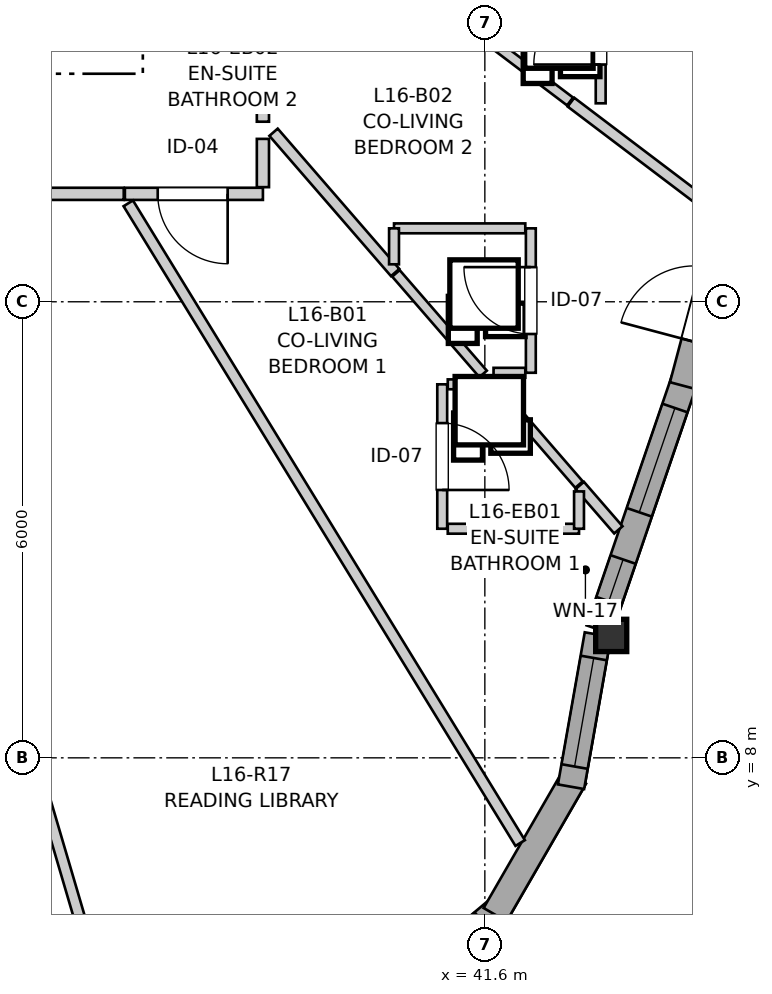
"""IFC4 building model, lengths in metres.
Left out: names, types, materials, properties, quantities, classifications, styles, units other than length and angle.
Written with IfcOpenShell. Run it as: python <this file> out.ifc"""

import sys

from ifc_helpers import new_model, si_unit, direction, frame, frame_2d, origin, origin_2d, place, context, subcontext, project, spatial, rectangle, i_section, extrude, source, transform, mapped, element, fill, save


model = new_model("IFC4")
c1 = context("Model", 3, precision=1e-05, world=origin(), true_north=direction((0.0, 1.0)))
c2 = subcontext(c1, "Body", "Model", "MODEL_VIEW")
j1 = project(units=[si_unit("LENGTHUNIT", "METRE"), si_unit("PLANEANGLEUNIT", "RADIAN")], contexts=[c1])
p1 = place(None, origin())
s1 = spatial("IfcSite", under=j1, at=p1, CompositionType="ELEMENT")
p2 = place(p1, origin())
s2 = spatial("IfcBuilding", under=s1, at=p2, CompositionType="ELEMENT")
p3 = place(p2, frame((0.0, 0.0, 55.8)))
s3 = spatial("IfcBuildingStorey", under=s2, at=p3, CompositionType="ELEMENT", Elevation=55.8)
m1 = source(origin(), c2, "Body", "SweptSolid", [
    extrude(i_section(OverallWidth=0.409, OverallDepth=0.425, WebThickness=0.03, FlangeThickness=0.048, FilletRadius=0.015, at=origin_2d()), origin(), (0.0, 0.0, 1.0), 2.94),
])
p4 = place(p3, frame((43.262, 9.611, 0.0), z_axis=(0.0, 0.0, 1.0), x_axis=(1.0, 0.0, 0.0)))
e1 = element("IfcColumn", 1, at=p4, inside=s3, PredefinedType="PILASTER", context=c2, shape_type="MappedRepresentation", body=[
    mapped(m1, transform((0.0, 0.0, 0.0), x_axis=(1.0, 0.0, 0.0), y_axis=(0.0, 1.0, 0.0), z_axis=(0.0, 0.0, 1.0), scale=1.0)),
])
p5 = place(p3, frame((40.221, 4.697, 0.0), z_axis=(0.0, 0.0, 1.0), x_axis=(0.766024572719, 0.642811289563, 0.0)))
e2 = element("IfcWall", 2, at=p5, inside=s3, PredefinedType="SOLIDWALL", context=c2, shape_type="SweptSolid", body=[
    extrude(rectangle(XDim=2.09, YDim=0.35, at=frame_2d((1.045, 0.0))), origin(), (0.0, 0.0, 1.0), 2.42),
])
p6 = place(p5, frame((0.32, 0.0, 0.82)))
e3 = element("IfcOpeningElement", 3, at=p6, cuts=e2, PredefinedType="OPENING", context=c2, shape_type="SweptSolid", body=[
    extrude(rectangle(XDim=1.45, YDim=1.25, at=frame_2d((0.725, 0.625))), frame((0.0, 0.185, 0.0), z_axis=(0.0, -1.0, 0.0), x_axis=(1.0, 0.0, 0.0)), (0.0, 0.0, 1.0), 0.37),
])
p7 = place(p3, frame((41.735, 5.937, 0.0), z_axis=(0.0, 0.0, 1.0), x_axis=(0.49990781971, 0.866078617559, 0.0)))
e4 = element("IfcWall", 4, at=p7, inside=s3, PredefinedType="SOLIDWALL", context=c2, shape_type="SweptSolid", body=[
    extrude(rectangle(XDim=2.09, YDim=0.35, at=frame_2d((1.045, 0.0))), origin(), (0.0, 0.0, 1.0), 2.42),
])
p8 = place(p3, frame((42.734, 7.62, 0.0), z_axis=(0.0, 0.0, 1.0), x_axis=(0.173607131876, 0.984814989611, 0.0)))
e5 = element("IfcWall", 5, at=p8, inside=s3, PredefinedType="SOLIDWALL", context=c2, shape_type="SweptSolid", body=[
    extrude(rectangle(XDim=2.032, YDim=0.35, at=frame_2d((1.016, 0.0))), origin(), (0.0, 0.0, 1.0), 2.42),
])
p9 = place(p8, frame((0.27, 0.0, 0.82)))
e6 = element("IfcOpeningElement", 6, at=p9, cuts=e5, PredefinedType="OPENING", context=c2, shape_type="SweptSolid", body=[
    extrude(rectangle(XDim=1.45, YDim=1.25, at=frame_2d((0.725, 0.625))), frame((0.0, 0.185, 0.0), z_axis=(0.0, -1.0, 0.0), x_axis=(1.0, 0.0, 0.0)), (0.0, 0.0, 1.0), 0.37),
])
p10 = place(p3, frame((43.104, 9.686, 0.0), z_axis=(0.0, 0.0, 1.0), x_axis=(0.323558843572, 0.946208050455, 0.0)))
e7 = element("IfcWall", 7, at=p10, inside=s3, PredefinedType="SOLIDWALL", context=c2, shape_type="SweptSolid", body=[
    extrude(rectangle(XDim=3.482, YDim=0.35, at=frame_2d((1.741, 0.0))), origin(), (0.0, 0.0, 1.0), 2.42),
])
p11 = place(p10, frame((0.396, 0.0, 0.82)))
e8 = element("IfcOpeningElement", 8, at=p11, cuts=e7, PredefinedType="OPENING", context=c2, shape_type="SweptSolid", body=[
    extrude(rectangle(XDim=0.58, YDim=1.35, at=frame_2d((0.29, 0.675))), frame((0.0, 0.185, 0.0), z_axis=(0.0, -1.0, 0.0), x_axis=(1.0, 0.0, 0.0)), (0.0, 0.0, 1.0), 0.37),
])
p12 = place(p10, frame((1.632, 0.0, 0.82)))
e9 = element("IfcOpeningElement", 9, at=p12, cuts=e7, PredefinedType="OPENING", context=c2, shape_type="SweptSolid", body=[
    extrude(rectangle(XDim=1.45, YDim=1.25, at=frame_2d((0.725, 0.625))), frame((0.0, 0.185, 0.0), z_axis=(0.0, -1.0, 0.0), x_axis=(1.0, 0.0, 0.0)), (0.0, 0.0, 1.0), 0.37),
])
p13 = place(p3, frame((44.205, 12.897, 0.0), z_axis=(0.0, 0.0, 1.0), x_axis=(0.257099428233, 0.966384956424, 0.0)))
e10 = element("IfcWall", 10, at=p13, inside=s3, PredefinedType="SOLIDWALL", context=c2, shape_type="SweptSolid", body=[
    extrude(rectangle(XDim=3.13, YDim=0.35, at=frame_2d((1.565, 0.0))), origin(), (0.0, 0.0, 1.0), 2.42),
])
p14 = place(p13, frame((0.595, 0.0, 0.0)))
e11 = element("IfcOpeningElement", 11, at=p14, cuts=e10, PredefinedType="OPENING", context=c2, shape_type="SweptSolid", body=[
    extrude(rectangle(XDim=1.0, YDim=2.1, at=frame_2d((0.5, 1.05))), frame((0.0, 0.185, 0.0), z_axis=(0.0, -1.0, 0.0), x_axis=(1.0, 0.0, 0.0)), (0.0, 0.0, 1.0), 0.37),
])
p15 = place(p3, frame((36.849, 15.42, 0.0), z_axis=(0.0, 0.0, 1.0), x_axis=(-1.0, 0.0, 0.0)))
e12 = element("IfcWall", 12, at=p15, inside=s3, PredefinedType="PARTITIONING", context=c2, shape_type="SweptSolid", body=[
    extrude(rectangle(XDim=3.401, YDim=0.16, at=frame_2d((1.701, 0.0))), origin(), (0.0, 0.0, 1.0), 2.94),
])
p16 = place(p15, frame((1.221, 0.0, 0.0)))
e13 = element("IfcOpeningElement", 13, at=p16, cuts=e12, PredefinedType="OPENING", context=c2, shape_type="SweptSolid", body=[
    extrude(rectangle(XDim=0.96, YDim=2.1, at=frame_2d((0.48, 1.05))), frame((0.0, 0.09, 0.0), z_axis=(0.0, -1.0, 0.0), x_axis=(1.0, 0.0, 0.0)), (0.0, 0.0, 1.0), 0.18),
])
p17 = place(p3, frame((38.68, 19.713, 0.0), z_axis=(0.0, 0.0, 1.0), x_axis=(0.0, -1.0, 0.0)))
e14 = element("IfcWall", 14, at=p17, inside=s3, PredefinedType="PARTITIONING", context=c2, shape_type="SweptSolid", body=[
    extrude(rectangle(XDim=3.344, YDim=0.16, at=frame_2d((1.672, 0.0))), origin(), (0.0, 0.0, 1.0), 2.94),
])
p18 = place(p17, frame((1.21, 0.0, 0.0)))
e15 = element("IfcOpeningElement", 15, at=p18, cuts=e14, PredefinedType="OPENING", context=c2, shape_type="SweptSolid", body=[
    extrude(rectangle(XDim=0.92, YDim=2.1, at=frame_2d((0.46, 1.05))), frame((0.0, 0.09, 0.0), z_axis=(0.0, -1.0, 0.0), x_axis=(1.0, 0.0, 0.0)), (0.0, 0.0, 1.0), 0.18),
])
p19 = place(p3, frame((41.039, 12.914, 0.0), z_axis=(0.0, 0.0, 1.0), x_axis=(0.0, -1.0, 0.0)))
e16 = element("IfcWall", 16, at=p19, inside=s3, PredefinedType="PARTITIONING", context=c2, shape_type="SweptSolid", body=[
    extrude(rectangle(XDim=1.9, YDim=0.13, at=frame_2d((0.95, 0.0))), origin(), (0.0, 0.0, 1.0), 2.94),
])
p20 = place(p19, frame((0.51, 0.0, 0.0)))
e17 = element("IfcOpeningElement", 17, at=p20, cuts=e16, PredefinedType="OPENING", context=c2, shape_type="SweptSolid", body=[
    extrude(rectangle(XDim=0.88, YDim=2.05, at=frame_2d((0.44, 1.025))), frame((0.0, 0.075, 0.0), z_axis=(0.0, -1.0, 0.0), x_axis=(1.0, 0.0, 0.0)), (0.0, 0.0, 1.0), 0.15),
])
p21 = place(p3, frame((42.205, 13.066, 0.0), z_axis=(0.0, 0.0, 1.0), x_axis=(0.0, 1.0, 0.0)))
e18 = element("IfcWall", 18, at=p21, inside=s3, PredefinedType="PARTITIONING", context=c2, shape_type="SweptSolid", body=[
    extrude(rectangle(XDim=1.9, YDim=0.13, at=frame_2d((0.95, 0.0))), origin(), (0.0, 0.0, 1.0), 2.94),
])
p22 = place(p21, frame((0.51, 0.0, 0.0)))
e19 = element("IfcOpeningElement", 19, at=p22, cuts=e18, PredefinedType="OPENING", context=c2, shape_type="SweptSolid", body=[
    extrude(rectangle(XDim=0.88, YDim=2.05, at=frame_2d((0.44, 1.025))), frame((0.0, 0.075, 0.0), z_axis=(0.0, -1.0, 0.0), x_axis=(1.0, 0.0, 0.0)), (0.0, 0.0, 1.0), 0.15),
])
p23 = place(p3, frame((43.124, 16.611, 0.0), z_axis=(0.0, 0.0, 1.0), x_axis=(0.0, 1.0, 0.0)))
e20 = element("IfcWall", 20, at=p23, inside=s3, PredefinedType="PARTITIONING", context=c2, shape_type="SweptSolid", body=[
    extrude(rectangle(XDim=1.9, YDim=0.13, at=frame_2d((0.95, 0.0))), origin(), (0.0, 0.0, 1.0), 2.94),
])
p24 = place(p23, frame((0.51, 0.0, 0.0)))
e21 = element("IfcOpeningElement", 21, at=p24, cuts=e20, PredefinedType="OPENING", context=c2, shape_type="SweptSolid", body=[
    extrude(rectangle(XDim=0.88, YDim=2.05, at=frame_2d((0.44, 1.025))), frame((0.0, 0.075, 0.0), z_axis=(0.0, -1.0, 0.0), x_axis=(1.0, 0.0, 0.0)), (0.0, 0.0, 1.0), 0.15),
])
p25 = place(p3, frame((38.68, 15.42, 0.0), z_axis=(0.0, 0.0, 1.0), x_axis=(-1.0, 0.0, 0.0)))
e22 = element("IfcWall", 22, at=p25, inside=s3, PredefinedType="PARTITIONING", context=c2, shape_type="SweptSolid", body=[
    extrude(rectangle(XDim=1.816, YDim=0.16, at=frame_2d((0.908, 0.0))), origin(), (0.0, 0.0, 1.0), 2.94),
])
p26 = place(p25, frame((0.464, 0.0, 0.0)))
e23 = element("IfcOpeningElement", 23, at=p26, cuts=e22, PredefinedType="OPENING", context=c2, shape_type="SweptSolid", body=[
    extrude(rectangle(XDim=0.92, YDim=2.1, at=frame_2d((0.46, 1.05))), frame((0.0, 0.09, 0.0), z_axis=(0.0, -1.0, 0.0), x_axis=(1.0, 0.0, 0.0)), (0.0, 0.0, 1.0), 0.18),
])
p27 = place(p3, frame((33.496, 15.312, 0.0), z_axis=(0.0, 0.0, 1.0), x_axis=(0.282353610079, -0.959310397564, 0.0)))
e24 = element("IfcWall", 24, at=p27, inside=s3, PredefinedType="PARTITIONING", context=c2, shape_type="SweptSolid", body=[
    extrude(rectangle(XDim=11.503, YDim=0.145, at=frame_2d((5.752, 0.0))), origin(), (0.0, 0.0, 1.0), 2.94),
])
p28 = place(p3, frame((36.908, 15.295, 0.0), z_axis=(0.0, 0.0, 1.0), x_axis=(0.522407183079, -0.852696156358, 0.0)))
e25 = element("IfcWall", 25, at=p28, inside=s3, PredefinedType="PARTITIONING", context=c2, shape_type="SweptSolid", body=[
    extrude(rectangle(XDim=9.87, YDim=0.145, at=frame_2d((4.935, 0.0))), origin(), (0.0, 0.0, 1.0), 2.94),
])
p29 = place(p3, frame((38.82, 16.23, 0.0), z_axis=(0.0, 0.0, 1.0), x_axis=(0.655037088123, -0.755596726556, 0.0)))
e26 = element("IfcWall", 26, at=p29, inside=s3, PredefinedType="PARTITIONING", context=c2, shape_type="SweptSolid", body=[
    extrude(rectangle(XDim=2.442, YDim=0.145, at=frame_2d((1.221, 0.0))), origin(), (0.0, 0.0, 1.0), 2.94),
])
p30 = place(p3, frame((42.733, 16.626, 0.0), z_axis=(0.0, 0.0, 1.0), x_axis=(0.797372907097, -0.603486907089, 0.0)))
e27 = element("IfcWall", 27, at=p30, inside=s3, PredefinedType="PARTITIONING", context=c2, shape_type="SweptSolid", body=[
    extrude(rectangle(XDim=2.371, YDim=0.145, at=frame_2d((1.186, 0.0))), origin(), (0.0, 0.0, 1.0), 2.94),
])
for number, where, z_axis, x_axis in (
    (28, (41.112, 11.014, 0.0), (0.0, 0.0, 1.0), (1.0, 0.0, 0.0)),
    (29, (40.405, 14.966, 0.0), (0.0, 0.0, 1.0), (1.0, 0.0, 0.0)),
):
    element("IfcWall", number, at=place(p3, frame(where, z_axis=z_axis, x_axis=x_axis)), inside=s3, PredefinedType="PARTITIONING", context=c2, shape_type="SweptSolid", body=[
        extrude(rectangle(XDim=1.727, YDim=0.13, at=frame_2d((0.864, 0.0))), origin(), (0.0, 0.0, 1.0), 2.94),
    ])
p31 = place(p3, frame((40.43, 14.374, 0.0), z_axis=(0.0, 0.0, 1.0), x_axis=(0.655121637619, -0.755523421162, 0.0)))
e30 = element("IfcWall", 30, at=p31, inside=s3, PredefinedType="PARTITIONING", context=c2, shape_type="SweptSolid", body=[
    extrude(rectangle(XDim=1.751, YDim=0.13, at=frame_2d((0.875, 0.0))), origin(), (0.0, 0.0, 1.0), 2.94),
])
p32 = place(p3, frame((41.696, 12.914, 0.0), z_axis=(0.0, 0.0, 1.0), x_axis=(0.654882611276, -0.755730616985, 0.0)))
e31 = element("IfcWall", 31, at=p32, inside=s3, PredefinedType="PARTITIONING", context=c2, shape_type="SweptSolid", body=[
    extrude(rectangle(XDim=1.745, YDim=0.13, at=frame_2d((0.873, 0.0))), origin(), (0.0, 0.0, 1.0), 2.94),
])
p33 = place(p3, frame((41.351, 17.672, 0.0), z_axis=(0.0, 0.0, 1.0), x_axis=(0.797400841938, -0.603449995672, 0.0)))
e32 = element("IfcWall", 32, at=p33, inside=s3, PredefinedType="PARTITIONING", context=c2, shape_type="SweptSolid", body=[
    extrude(rectangle(XDim=1.718, YDim=0.13, at=frame_2d((0.859, 0.0))), origin(), (0.0, 0.0, 1.0), 2.94),
])
p34 = place(p3, frame((38.68, 15.508, 0.0), z_axis=(0.0, 0.0, 1.0), x_axis=(0.0, 1.0, 0.0)))
e33 = element("IfcWall", 33, at=p34, inside=s3, PredefinedType="PARTITIONING", context=c2, shape_type="SweptSolid", body=[
    extrude(rectangle(XDim=0.635, YDim=0.16, at=frame_2d((0.317, 0.0))), origin(), (0.0, 0.0, 1.0), 2.94),
])
p35 = place(p3, frame((42.849, 11.584, 0.0), z_axis=(0.0, 0.0, 1.0), x_axis=(0.655530542193, -0.755168662123, 0.0)))
e34 = element("IfcWall", 34, at=p35, inside=s3, PredefinedType="PARTITIONING", context=c2, shape_type="SweptSolid", body=[
    extrude(rectangle(XDim=0.774, YDim=0.145, at=frame_2d((0.387, 0.0))), origin(), (0.0, 0.0, 1.0), 2.94),
])
p36 = place(p3, frame((41.112, 12.914, 0.0), z_axis=(0.0, 0.0, 1.0), x_axis=(1.0, 0.0, 0.0)))
e35 = element("IfcWall", 35, at=p36, inside=s3, PredefinedType="PARTITIONING", context=c2, shape_type="SweptSolid", body=[
    extrude(rectangle(XDim=0.434, YDim=0.13, at=frame_2d((0.217, 0.0))), origin(), (0.0, 0.0, 1.0), 2.94),
])
p37 = place(p3, frame((41.714, 13.066, 0.0), z_axis=(0.0, 0.0, 1.0), x_axis=(1.0, 0.0, 0.0)))
e36 = element("IfcWall", 36, at=p37, inside=s3, PredefinedType="PARTITIONING", context=c2, shape_type="SweptSolid", body=[
    extrude(rectangle(XDim=0.418, YDim=0.13, at=frame_2d((0.209, 0.0))), origin(), (0.0, 0.0, 1.0), 2.94),
])
p38 = place(p3, frame((42.839, 11.014, 0.0), z_axis=(0.0, 0.0, 1.0), x_axis=(0.0, 1.0, 0.0)))
e37 = element("IfcWall", 37, at=p38, inside=s3, PredefinedType="PARTITIONING", context=c2, shape_type="SweptSolid", body=[
    extrude(rectangle(XDim=0.491, YDim=0.13, at=frame_2d((0.246, 0.0))), origin(), (0.0, 0.0, 1.0), 2.94),
])
p39 = place(p3, frame((40.405, 14.493, 0.0), z_axis=(0.0, 0.0, 1.0), x_axis=(0.0, 1.0, 0.0)))
e38 = element("IfcWall", 38, at=p39, inside=s3, PredefinedType="PARTITIONING", context=c2, shape_type="SweptSolid", body=[
    extrude(rectangle(XDim=0.473, YDim=0.13, at=frame_2d((0.237, 0.0))), origin(), (0.0, 0.0, 1.0), 2.94),
])
m2 = source(origin(), c2, "Body", "SweptSolid", [
    extrude(rectangle(XDim=1.45, YDim=1.25, at=frame_2d((0.725, 0.625))), frame((0.0, 0.03, 0.0), z_axis=(0.0, -1.0, 0.0), x_axis=(1.0, 0.0, 0.0)), (0.0, 0.0, 1.0), 0.06),
])
p40 = place(p9, origin())
e39 = element("IfcWindow", 39, at=p40, inside=s3, PartitioningType="SINGLE_PANEL", PredefinedType="WINDOW", context=c2, shape_type="MappedRepresentation", body=[
    mapped(m2, transform((0.0, 0.0, 0.0), x_axis=(1.0, 0.0, 0.0), y_axis=(0.0, 1.0, 0.0), z_axis=(0.0, 0.0, 1.0), scale=1.0)),
])
fill(e6, e39)
m3 = source(origin(), c2, "Body", "SweptSolid", [
    extrude(rectangle(XDim=0.58, YDim=1.35, at=frame_2d((0.29, 0.675))), frame((0.0, 0.03, 0.0), z_axis=(0.0, -1.0, 0.0), x_axis=(1.0, 0.0, 0.0)), (0.0, 0.0, 1.0), 0.06),
])
p41 = place(p11, origin())
e40 = element("IfcWindow", 40, at=p41, inside=s3, PartitioningType="SINGLE_PANEL", PredefinedType="WINDOW", context=c2, shape_type="MappedRepresentation", body=[
    mapped(m3, transform((0.0, 0.0, 0.0), x_axis=(1.0, 0.0, 0.0), y_axis=(0.0, 1.0, 0.0), z_axis=(0.0, 0.0, 1.0), scale=1.0)),
])
fill(e8, e40)
p42 = place(p12, origin())
e41 = element("IfcWindow", 41, at=p42, inside=s3, PartitioningType="SINGLE_PANEL", PredefinedType="WINDOW", context=c2, shape_type="MappedRepresentation", body=[
    mapped(m2, transform((0.0, 0.0, 0.0), x_axis=(1.0, 0.0, 0.0), y_axis=(0.0, 1.0, 0.0), z_axis=(0.0, 0.0, 1.0), scale=1.0)),
])
fill(e9, e41)
m4 = source(origin(), c2, "Body", "SweptSolid", [
    extrude(rectangle(XDim=0.88, YDim=2.05, at=frame_2d((0.44, 1.025))), frame((0.0, 0.025, 0.0), z_axis=(0.0, -1.0, 0.0), x_axis=(1.0, 0.0, 0.0)), (0.0, 0.0, 1.0), 0.05),
])
p43 = place(p20, origin())
e42 = element("IfcDoor", 42, at=p43, inside=s3, OperationType="SINGLE_SWING_RIGHT", PredefinedType="DOOR", context=c2, shape_type="MappedRepresentation", body=[
    mapped(m4, transform((0.0, 0.0, 0.0), x_axis=(1.0, 0.0, 0.0), y_axis=(0.0, 1.0, 0.0), z_axis=(0.0, 0.0, 1.0), scale=1.0)),
])
fill(e17, e42)
p44 = place(p22, origin())
e43 = element("IfcDoor", 43, at=p44, inside=s3, OperationType="SINGLE_SWING_RIGHT", PredefinedType="DOOR", context=c2, shape_type="MappedRepresentation", body=[
    mapped(m4, transform((0.0, 0.0, 0.0), x_axis=(1.0, 0.0, 0.0), y_axis=(0.0, 1.0, 0.0), z_axis=(0.0, 0.0, 1.0), scale=1.0)),
])
fill(e19, e43)
p45 = place(p24, origin())
e44 = element("IfcDoor", 44, at=p45, inside=s3, OperationType="SINGLE_SWING_LEFT", PredefinedType="DOOR", context=c2, shape_type="MappedRepresentation", body=[
    mapped(m4, transform((0.0, 0.0, 0.0), x_axis=(1.0, 0.0, 0.0), y_axis=(0.0, 1.0, 0.0), z_axis=(0.0, 0.0, 1.0), scale=1.0)),
])
fill(e21, e44)
m5 = source(origin(), c2, "Body", "SweptSolid", [
    extrude(rectangle(XDim=0.92, YDim=2.1, at=frame_2d((0.46, 1.05))), frame((0.0, 0.025, 0.0), z_axis=(0.0, -1.0, 0.0), x_axis=(1.0, 0.0, 0.0)), (0.0, 0.0, 1.0), 0.05),
])
p46 = place(p26, origin())
e45 = element("IfcDoor", 45, at=p46, inside=s3, OperationType="SINGLE_SWING_LEFT", PredefinedType="DOOR", context=c2, shape_type="MappedRepresentation", body=[
    mapped(m5, transform((0.0, 0.0, 0.0), x_axis=(1.0, 0.0, 0.0), y_axis=(0.0, 1.0, 0.0), z_axis=(0.0, 0.0, 1.0), scale=1.0)),
])
fill(e23, e45)
save(model, sys.argv[1])
